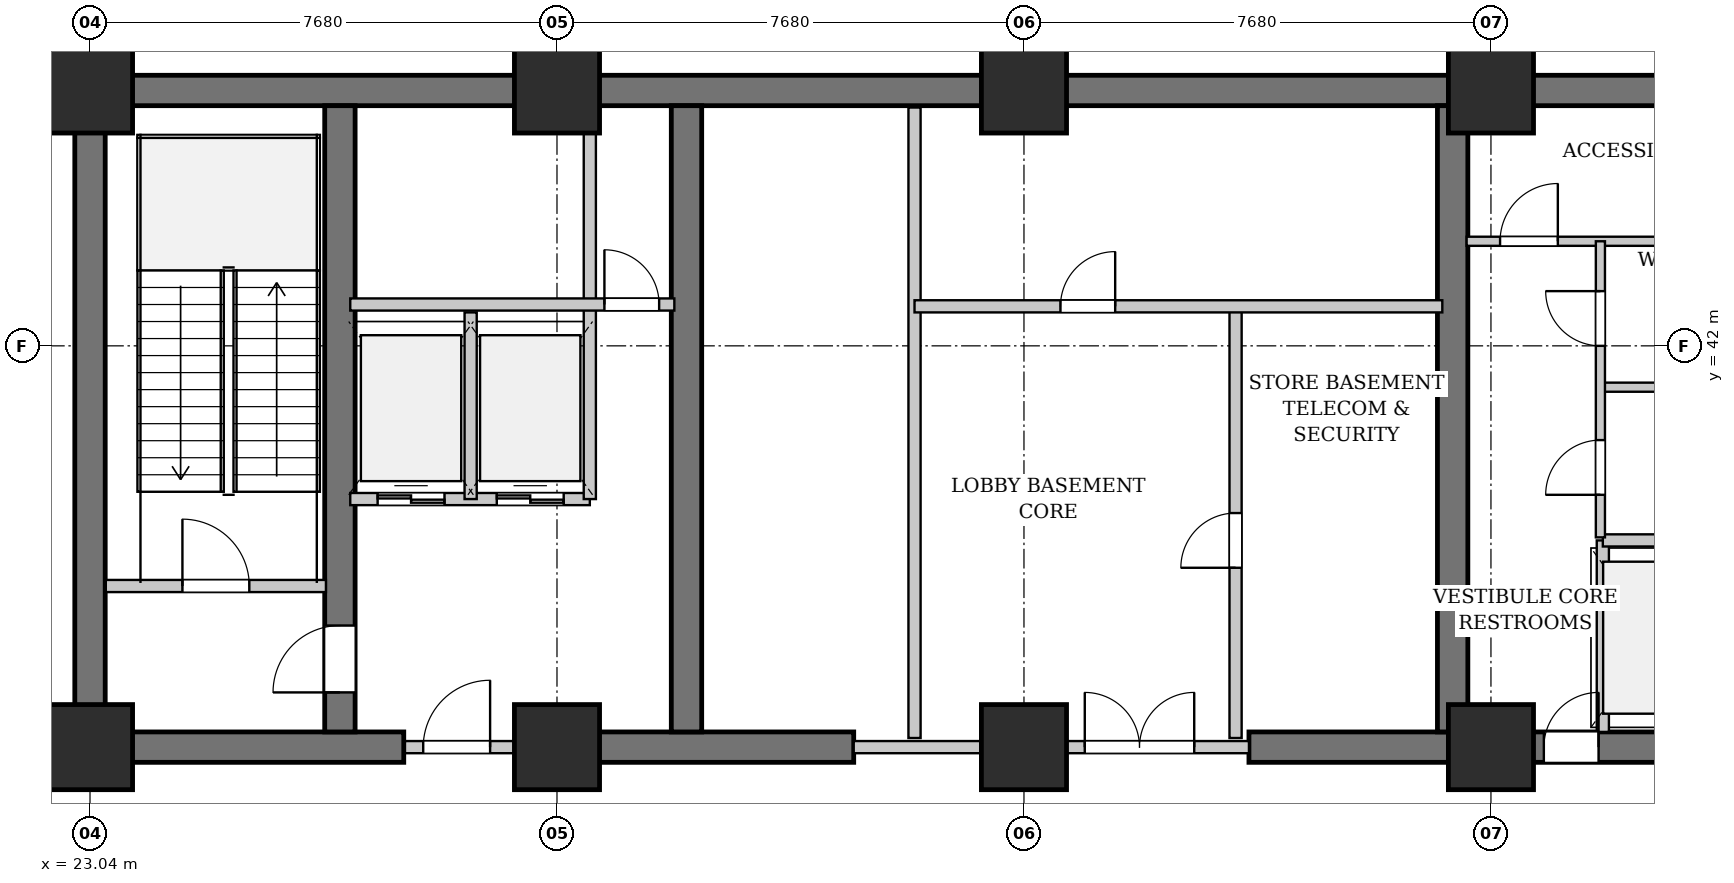
"""IFC4 building model, lengths in metres.
Left out: names, types, materials, properties, quantities, classifications, styles, units other than length and angle.
Written with IfcOpenShell. Run it as: python <this file> out.ifc"""

import sys

from ifc_helpers import new_model, si_unit, direction, frame, frame_2d, origin, origin_2d, place, context, subcontext, project, spatial, rectangle, extrude, element, fill, save


model = new_model("IFC4")
c1 = context("Model", 3, precision=1e-05, world=origin(), true_north=direction((0.0, 1.0)))
c2 = subcontext(c1, "Body", "Model", "MODEL_VIEW")
j1 = project(units=[si_unit("LENGTHUNIT", "METRE"), si_unit("PLANEANGLEUNIT", "RADIAN")], contexts=[c1])
p1 = place(None, origin())
s1 = spatial("IfcSite", under=j1, at=p1, CompositionType="ELEMENT")
p2 = place(p1, origin())
s2 = spatial("IfcBuilding", under=s1, at=p2, CompositionType="ELEMENT")
p3 = place(p2, frame((0.0, 0.0, -10.0)))
s3 = spatial("IfcBuildingStorey", under=s2, at=p3, CompositionType="ELEMENT", Elevation=-10.0)
p4 = place(p3, frame((22.79, 46.2, 0.0), z_axis=(0.0, 0.0, 1.0), x_axis=(1.0, 0.0, 0.0)))
e1 = element("IfcWall", 1, at=p4, inside=s3, PredefinedType="SHEAR", context=c2, shape_type="SweptSolid", body=[
    extrude(rectangle(XDim=31.22, YDim=0.5, at=frame_2d((15.61, 0.0))), origin(), (0.0, 0.0, 1.0), 4.65),
])
p5 = place(p3, frame((22.79, 35.4, 0.0), z_axis=(0.0, 0.0, 1.0), x_axis=(1.0, 0.0, 0.0)))
e2 = element("IfcWall", 2, at=p5, inside=s3, PredefinedType="SHEAR", context=c2, shape_type="SweptSolid", body=[
    extrude(rectangle(XDim=5.41, YDim=0.5, at=frame_2d((2.705, 0.0))), origin(), (0.0, 0.0, 1.0), 4.65),
])
p6 = place(p3, frame((30.72, 35.4, 0.0), z_axis=(0.0, 0.0, 1.0), x_axis=(1.0, 0.0, 0.0)))
e3 = element("IfcWall", 3, at=p6, inside=s3, PredefinedType="SHEAR", context=c2, shape_type="SweptSolid", body=[
    extrude(rectangle(XDim=4.88, YDim=0.5, at=frame_2d((2.44, 0.0))), origin(), (0.0, 0.0, 1.0), 4.65),
])
p7 = place(p3, frame((42.1, 35.4, 0.0), z_axis=(0.0, 0.0, 1.0), x_axis=(1.0, 0.0, 0.0)))
e4 = element("IfcWall", 4, at=p7, inside=s3, PredefinedType="SHEAR", context=c2, shape_type="SweptSolid", body=[
    extrude(rectangle(XDim=8.05, YDim=0.5, at=frame_2d((4.025, 0.0))), origin(), (0.0, 0.0, 1.0), 4.65),
])
p8 = place(p7, frame((4.85, 0.0, 0.0)))
e5 = element("IfcOpeningElement", 5, at=p8, cuts=e4, PredefinedType="OPENING", context=c2, shape_type="SweptSolid", body=[
    extrude(rectangle(XDim=0.9, YDim=2.15, at=frame_2d((0.45, 1.075))), frame((0.0, 0.26, 0.0), z_axis=(0.0, -1.0, 0.0), x_axis=(1.0, 0.0, 0.0)), (0.0, 0.0, 1.0), 0.52),
])
p9 = place(p3, frame((23.04, 35.65, 0.0), z_axis=(0.0, 0.0, 1.0), x_axis=(0.0, 1.0, 0.0)))
e6 = element("IfcWall", 6, at=p9, inside=s3, PredefinedType="SHEAR", context=c2, shape_type="SweptSolid", body=[
    extrude(rectangle(XDim=10.3, YDim=0.5, at=frame_2d((5.15, 0.0))), origin(), (0.0, 0.0, 1.0), 4.65),
])
p10 = place(p3, frame((27.15, 35.65, 0.0), z_axis=(0.0, 0.0, 1.0), x_axis=(0.0, 1.0, 0.0)))
e7 = element("IfcWall", 7, at=p10, inside=s3, PredefinedType="SHEAR", context=c2, shape_type="SweptSolid", body=[
    extrude(rectangle(XDim=10.3, YDim=0.5, at=frame_2d((5.15, 0.0))), origin(), (0.0, 0.0, 1.0), 4.65),
])
p11 = place(p10, frame((0.65, 0.0, 0.0)))
e8 = element("IfcOpeningElement", 8, at=p11, cuts=e7, PredefinedType="OPENING", context=c2, shape_type="SweptSolid", body=[
    extrude(rectangle(XDim=1.1, YDim=2.15, at=frame_2d((0.55, 1.075))), frame((0.0, 0.26, 0.0), z_axis=(0.0, -1.0, 0.0), x_axis=(1.0, 0.0, 0.0)), (0.0, 0.0, 1.0), 0.52),
])
for number, where, z_axis, x_axis in (
    (9, (32.85, 35.65, 0.0), (0.0, 0.0, 1.0), (0.0, 1.0, 0.0)),
    (10, (45.45, 35.65, 0.0), (0.0, 0.0, 1.0), (0.0, 1.0, 0.0)),
):
    element("IfcWall", number, at=place(p3, frame(where, z_axis=z_axis, x_axis=x_axis)), inside=s3, PredefinedType="SHEAR", context=c2, shape_type="SweptSolid", body=[
        extrude(rectangle(XDim=10.3, YDim=0.5, at=frame_2d((5.15, 0.0))), origin(), (0.0, 0.0, 1.0), 4.65),
    ])
for number, where, z_axis, x_axis in (
    (11, (23.04, 35.4, 0.0), (0.0, 0.0, 1.0), (1.0, 0.0, 0.0)),
    (12, (23.04, 46.2, 0.0), (0.0, 0.0, 1.0), (1.0, 0.0, 0.0)),
    (13, (30.72, 35.4, 0.0), (0.0, 0.0, 1.0), (1.0, 0.0, 0.0)),
    (14, (30.72, 46.2, 0.0), (0.0, 0.0, 1.0), (1.0, 0.0, 0.0)),
    (15, (38.4, 35.4, 0.0), (0.0, 0.0, 1.0), (1.0, 0.0, 0.0)),
    (16, (38.4, 46.2, 0.0), (0.0, 0.0, 1.0), (1.0, 0.0, 0.0)),
    (17, (46.08, 35.4, 0.0), (0.0, 0.0, 1.0), (1.0, 0.0, 0.0)),
    (18, (46.08, 46.2, 0.0), (0.0, 0.0, 1.0), (1.0, 0.0, 0.0)),
):
    element("IfcColumn", number, at=place(p3, frame(where, z_axis=z_axis, x_axis=x_axis)), inside=s3, PredefinedType="COLUMN", context=c2, shape_type="SweptSolid", body=[
        extrude(rectangle(XDim=1.4, YDim=1.4, at=origin_2d()), origin(), (0.0, 0.0, 1.0), 5.0),
    ])
p12 = place(p3, frame((23.3, 38.05, 0.0), z_axis=(0.0, 0.0, 1.0), x_axis=(1.0, 0.0, 0.0)))
e19 = element("IfcWall", 19, at=p12, inside=s3, PredefinedType="PARTITIONING", context=c2, shape_type="SweptSolid", body=[
    extrude(rectangle(XDim=3.62, YDim=0.2, at=frame_2d((1.81, 0.0))), origin(), (0.0, 0.0, 1.0), 4.65),
])
p13 = place(p12, frame((1.26, 0.0, 0.0)))
e20 = element("IfcOpeningElement", 20, at=p13, cuts=e19, PredefinedType="OPENING", context=c2, shape_type="SweptSolid", body=[
    extrude(rectangle(XDim=1.1, YDim=2.15, at=frame_2d((0.55, 1.075))), frame((0.0, 0.11, 0.0), z_axis=(0.0, -1.0, 0.0), x_axis=(1.0, 0.0, 0.0)), (0.0, 0.0, 1.0), 0.22),
])
p14 = place(p3, frame((28.22, 35.4, 0.0), z_axis=(0.0, 0.0, 1.0), x_axis=(1.0, 0.0, 0.0)))
e21 = element("IfcWall", 21, at=p14, inside=s3, PredefinedType="PARTITIONING", context=c2, shape_type="SweptSolid", body=[
    extrude(rectangle(XDim=2.5, YDim=0.2, at=frame_2d((1.25, 0.0))), origin(), (0.0, 0.0, 1.0), 3.845),
])
p15 = place(p14, frame((0.3, 0.0, 0.0)))
e22 = element("IfcOpeningElement", 22, at=p15, cuts=e21, PredefinedType="OPENING", context=c2, shape_type="SweptSolid", body=[
    extrude(rectangle(XDim=1.1, YDim=2.15, at=frame_2d((0.55, 1.075))), frame((0.0, 0.11, 0.0), z_axis=(0.0, -1.0, 0.0), x_axis=(1.0, 0.0, 0.0)), (0.0, 0.0, 1.0), 0.22),
])
p16 = place(p3, frame((27.32, 39.48, 0.0), z_axis=(0.0, 0.0, 1.0), x_axis=(1.0, 0.0, 0.0)))
e23 = element("IfcWall", 23, at=p16, inside=s3, PredefinedType="PARTITIONING", context=c2, shape_type="SweptSolid", body=[
    extrude(rectangle(XDim=3.94, YDim=0.2, at=frame_2d((1.97, 0.0))), origin(), (0.0, 0.0, 1.0), 4.65),
])
p17 = place(p16, frame((0.45, 0.0, 0.0)))
e24 = element("IfcOpeningElement", 24, at=p17, cuts=e23, PredefinedType="OPENING", context=c2, shape_type="SweptSolid", body=[
    extrude(rectangle(XDim=1.1, YDim=2.2, at=frame_2d((0.55, 1.1))), frame((0.0, 0.11, 0.0), z_axis=(0.0, -1.0, 0.0), x_axis=(1.0, 0.0, 0.0)), (0.0, 0.0, 1.0), 0.22),
])
p18 = place(p16, frame((2.41, 0.0, 0.0)))
e25 = element("IfcOpeningElement", 25, at=p18, cuts=e23, PredefinedType="OPENING", context=c2, shape_type="SweptSolid", body=[
    extrude(rectangle(XDim=1.1, YDim=2.2, at=frame_2d((0.55, 1.1))), frame((0.0, 0.11, 0.0), z_axis=(0.0, -1.0, 0.0), x_axis=(1.0, 0.0, 0.0)), (0.0, 0.0, 1.0), 0.22),
])
p19 = place(p3, frame((29.3, 39.48, 0.0), z_axis=(0.0, 0.0, 1.0), x_axis=(0.0, 1.0, 0.0)))
e26 = element("IfcWall", 26, at=p19, inside=s3, PredefinedType="PARTITIONING", context=c2, shape_type="SweptSolid", body=[
    extrude(rectangle(XDim=3.07, YDim=0.2, at=frame_2d((1.535, 0.0))), origin(), (0.0, 0.0, 1.0), 4.65),
])
p20 = place(p3, frame((31.26, 39.48, 0.0), z_axis=(0.0, 0.0, 1.0), x_axis=(0.0, 1.0, 0.0)))
e27 = element("IfcWall", 27, at=p20, inside=s3, PredefinedType="PARTITIONING", context=c2, shape_type="SweptSolid", body=[
    extrude(rectangle(XDim=6.44, YDim=0.2, at=frame_2d((3.22, 0.0))), origin(), (0.0, 0.0, 1.0), 4.65),
])
p21 = place(p3, frame((27.32, 42.68, 0.0), z_axis=(0.0, 0.0, 1.0), x_axis=(1.0, 0.0, 0.0)))
e28 = element("IfcWall", 28, at=p21, inside=s3, PredefinedType="PARTITIONING", context=c2, shape_type="SweptSolid", body=[
    extrude(rectangle(XDim=5.33, YDim=0.2, at=frame_2d((2.665, 0.0))), origin(), (0.0, 0.0, 1.0), 4.65),
])
p22 = place(p21, frame((4.18, 0.0, 0.0)))
e29 = element("IfcOpeningElement", 29, at=p22, cuts=e28, PredefinedType="OPENING", context=c2, shape_type="SweptSolid", body=[
    extrude(rectangle(XDim=0.9, YDim=2.15, at=frame_2d((0.45, 1.075))), frame((0.0, 0.11, 0.0), z_axis=(0.0, -1.0, 0.0), x_axis=(1.0, 0.0, 0.0)), (0.0, 0.0, 1.0), 0.22),
])
p23 = place(p3, frame((35.6, 35.4, 0.0), z_axis=(0.0, 0.0, 1.0), x_axis=(1.0, 0.0, 0.0)))
e30 = element("IfcWall", 30, at=p23, inside=s3, PredefinedType="PARTITIONING", context=c2, shape_type="SweptSolid", body=[
    extrude(rectangle(XDim=6.5, YDim=0.2, at=frame_2d((3.25, 0.0))), origin(), (0.0, 0.0, 1.0), 3.845),
])
p24 = place(p23, frame((3.8, 0.0, 0.0)))
e31 = element("IfcOpeningElement", 31, at=p24, cuts=e30, PredefinedType="OPENING", context=c2, shape_type="SweptSolid", body=[
    extrude(rectangle(XDim=1.8, YDim=2.3, at=frame_2d((0.9, 1.15))), frame((0.0, 0.11, 0.0), z_axis=(0.0, -1.0, 0.0), x_axis=(1.0, 0.0, 0.0)), (0.0, 0.0, 1.0), 0.22),
])
p25 = place(p3, frame((36.6, 35.55, 0.0), z_axis=(0.0, 0.0, 1.0), x_axis=(0.0, 1.0, 0.0)))
e32 = element("IfcWall", 32, at=p25, inside=s3, PredefinedType="PARTITIONING", context=c2, shape_type="SweptSolid", body=[
    extrude(rectangle(XDim=10.37, YDim=0.2, at=frame_2d((5.185, 0.0))), origin(), (0.0, 0.0, 1.0), 4.65),
])
p26 = place(p3, frame((41.88, 35.55, 0.0), z_axis=(0.0, 0.0, 1.0), x_axis=(0.0, 1.0, 0.0)))
e33 = element("IfcWall", 33, at=p26, inside=s3, PredefinedType="PARTITIONING", context=c2, shape_type="SweptSolid", body=[
    extrude(rectangle(XDim=7.1, YDim=0.2, at=frame_2d((3.55, 0.0))), origin(), (0.0, 0.0, 1.0), 4.65),
])
p27 = place(p26, frame((2.8, 0.0, 0.0)))
e34 = element("IfcOpeningElement", 34, at=p27, cuts=e33, PredefinedType="OPENING", context=c2, shape_type="SweptSolid", body=[
    extrude(rectangle(XDim=0.9, YDim=2.15, at=frame_2d((0.45, 1.075))), frame((0.0, 0.11, 0.0), z_axis=(0.0, -1.0, 0.0), x_axis=(1.0, 0.0, 0.0)), (0.0, 0.0, 1.0), 0.22),
])
p28 = place(p3, frame((36.6, 42.65, 0.0), z_axis=(0.0, 0.0, 1.0), x_axis=(1.0, 0.0, 0.0)))
e35 = element("IfcWall", 35, at=p28, inside=s3, PredefinedType="PARTITIONING", context=c2, shape_type="SweptSolid", body=[
    extrude(rectangle(XDim=8.68, YDim=0.2, at=frame_2d((4.34, 0.0))), origin(), (0.0, 0.0, 1.0), 4.65),
])
p29 = place(p28, frame((2.4, 0.0, 0.0)))
e36 = element("IfcOpeningElement", 36, at=p29, cuts=e35, PredefinedType="OPENING", context=c2, shape_type="SweptSolid", body=[
    extrude(rectangle(XDim=0.9, YDim=2.15, at=frame_2d((0.45, 1.075))), frame((0.0, 0.11, 0.0), z_axis=(0.0, -1.0, 0.0), x_axis=(1.0, 0.0, 0.0)), (0.0, 0.0, 1.0), 0.22),
])
p30 = place(p3, frame((47.92, 35.65, 0.0), z_axis=(0.0, 0.0, 1.0), x_axis=(0.0, 1.0, 0.0)))
e37 = element("IfcWall", 37, at=p30, inside=s3, PredefinedType="PARTITIONING", context=c2, shape_type="SweptSolid", body=[
    extrude(rectangle(XDim=3.15, YDim=0.2, at=frame_2d((1.575, 0.0))), origin(), (0.0, 0.0, 1.0), 4.65),
])
p31 = place(p3, frame((47.92, 38.8, 0.0), z_axis=(0.0, 0.0, 1.0), x_axis=(1.0, 0.0, 0.0)))
e38 = element("IfcWall", 38, at=p31, inside=s3, PredefinedType="PARTITIONING", context=c2, shape_type="SweptSolid", body=[
    extrude(rectangle(XDim=1.86, YDim=0.2, at=frame_2d((0.93, 0.0))), origin(), (0.0, 0.0, 1.0), 4.65),
])
p32 = place(p3, frame((45.68, 43.72, 0.0), z_axis=(0.0, 0.0, 1.0), x_axis=(1.0, 0.0, 0.0)))
e39 = element("IfcWall", 39, at=p32, inside=s3, PredefinedType="PARTITIONING", context=c2, shape_type="SweptSolid", body=[
    extrude(rectangle(XDim=4.5, YDim=0.15, at=frame_2d((2.25, 0.0))), origin(), (0.0, 0.0, 1.0), 4.65),
])
p33 = place(p32, frame((0.55, 0.0, 0.0)))
e40 = element("IfcOpeningElement", 40, at=p33, cuts=e39, PredefinedType="OPENING", context=c2, shape_type="SweptSolid", body=[
    extrude(rectangle(XDim=0.95, YDim=2.15, at=frame_2d((0.475, 1.075))), frame((0.0, 0.085, 0.0), z_axis=(0.0, -1.0, 0.0), x_axis=(1.0, 0.0, 0.0)), (0.0, 0.0, 1.0), 0.17),
])
p34 = place(p3, frame((47.88, 41.32, 0.0), z_axis=(0.0, 0.0, 1.0), x_axis=(1.0, 0.0, 0.0)))
e41 = element("IfcWall", 41, at=p34, inside=s3, PredefinedType="PARTITIONING", context=c2, shape_type="SweptSolid", body=[
    extrude(rectangle(XDim=2.3, YDim=0.15, at=frame_2d((1.15, 0.0))), origin(), (0.0, 0.0, 1.0), 4.65),
])
p35 = place(p3, frame((47.88, 38.85, 0.0), z_axis=(0.0, 0.0, 1.0), x_axis=(0.0, 1.0, 0.0)))
e42 = element("IfcWall", 42, at=p35, inside=s3, PredefinedType="PARTITIONING", context=c2, shape_type="SweptSolid", body=[
    extrude(rectangle(XDim=4.87, YDim=0.15, at=frame_2d((2.435, 0.0))), origin(), (0.0, 0.0, 1.0), 4.65),
])
p36 = place(p35, frame((0.7, 0.0, 0.0)))
e43 = element("IfcOpeningElement", 43, at=p36, cuts=e42, PredefinedType="OPENING", context=c2, shape_type="SweptSolid", body=[
    extrude(rectangle(XDim=0.9, YDim=2.15, at=frame_2d((0.45, 1.075))), frame((0.0, 0.085, 0.0), z_axis=(0.0, -1.0, 0.0), x_axis=(1.0, 0.0, 0.0)), (0.0, 0.0, 1.0), 0.17),
])
p37 = place(p35, frame((3.15, 0.0, 0.0)))
e44 = element("IfcOpeningElement", 44, at=p37, cuts=e42, PredefinedType="OPENING", context=c2, shape_type="SweptSolid", body=[
    extrude(rectangle(XDim=0.9, YDim=2.15, at=frame_2d((0.45, 1.075))), frame((0.0, 0.085, 0.0), z_axis=(0.0, -1.0, 0.0), x_axis=(1.0, 0.0, 0.0)), (0.0, 0.0, 1.0), 0.17),
])
p38 = place(p3, frame((16.8, 35.28, 0.0), z_axis=(0.0, 0.0, 1.0), x_axis=(1.0, 0.0, 0.0)))
e45 = element("IfcWall", 45, at=p38, inside=s3, PredefinedType="PARTITIONING", context=c2, shape_type="SweptSolid", body=[
    extrude(rectangle(XDim=5.95, YDim=0.2, at=frame_2d((2.975, 0.0))), origin(), (0.0, 0.0, 1.0), 3.845),
])
p39 = place(p38, frame((2.425, 0.0, 0.0)))
e46 = element("IfcOpeningElement", 46, at=p39, cuts=e45, PredefinedType="OPENING", context=c2, shape_type="SweptSolid", body=[
    extrude(rectangle(XDim=1.1, YDim=2.15, at=frame_2d((0.55, 1.075))), frame((0.0, 0.11, 0.0), z_axis=(0.0, -1.0, 0.0), x_axis=(1.0, 0.0, 0.0)), (0.0, 0.0, 1.0), 0.22),
])
p40 = place(p13, origin())
e47 = element("IfcDoor", 47, at=p40, inside=s3, OperationType="SINGLE_SWING_LEFT", PredefinedType="DOOR", context=c2, shape_type="SweptSolid", body=[
    extrude(rectangle(XDim=1.1, YDim=2.15, at=frame_2d((0.55, 1.075))), frame((0.0, 0.025, 0.0), z_axis=(0.0, -1.0, 0.0), x_axis=(1.0, 0.0, 0.0)), (0.0, 0.0, 1.0), 0.05),
])
fill(e20, e47)
p41 = place(p15, origin())
e48 = element("IfcDoor", 48, at=p41, inside=s3, OperationType="SINGLE_SWING_RIGHT", PredefinedType="DOOR", context=c2, shape_type="SweptSolid", body=[
    extrude(rectangle(XDim=1.1, YDim=2.15, at=frame_2d((0.55, 1.075))), frame((0.0, 0.025, 0.0), z_axis=(0.0, -1.0, 0.0), x_axis=(1.0, 0.0, 0.0)), (0.0, 0.0, 1.0), 0.05),
])
fill(e22, e48)
p42 = place(p17, origin())
e49 = element("IfcDoor", 49, at=p42, inside=s3, OperationType="DOUBLE_DOOR_SLIDING", PredefinedType="DOOR", context=c2, shape_type="SweptSolid", body=[
    extrude(rectangle(XDim=1.1, YDim=2.2, at=frame_2d((0.55, 1.1))), frame((0.0, 0.025, 0.0), z_axis=(0.0, -1.0, 0.0), x_axis=(1.0, 0.0, 0.0)), (0.0, 0.0, 1.0), 0.05),
])
fill(e24, e49)
p43 = place(p18, origin())
e50 = element("IfcDoor", 50, at=p43, inside=s3, OperationType="DOUBLE_DOOR_SLIDING", PredefinedType="DOOR", context=c2, shape_type="SweptSolid", body=[
    extrude(rectangle(XDim=1.1, YDim=2.2, at=frame_2d((0.55, 1.1))), frame((0.0, 0.025, 0.0), z_axis=(0.0, -1.0, 0.0), x_axis=(1.0, 0.0, 0.0)), (0.0, 0.0, 1.0), 0.05),
])
fill(e25, e50)
p44 = place(p22, origin())
e51 = element("IfcDoor", 51, at=p44, inside=s3, OperationType="SINGLE_SWING_LEFT", PredefinedType="DOOR", context=c2, shape_type="SweptSolid", body=[
    extrude(rectangle(XDim=0.9, YDim=2.15, at=frame_2d((0.45, 1.075))), frame((0.0, 0.025, 0.0), z_axis=(0.0, -1.0, 0.0), x_axis=(1.0, 0.0, 0.0)), (0.0, 0.0, 1.0), 0.05),
])
fill(e29, e51)
p45 = place(p24, origin())
e52 = element("IfcDoor", 52, at=p45, inside=s3, OperationType="DOUBLE_DOOR_SINGLE_SWING", PredefinedType="DOOR", context=c2, shape_type="SweptSolid", body=[
    extrude(rectangle(XDim=1.8, YDim=2.3, at=frame_2d((0.9, 1.15))), frame((0.0, 0.025, 0.0), z_axis=(0.0, -1.0, 0.0), x_axis=(1.0, 0.0, 0.0)), (0.0, 0.0, 1.0), 0.05),
])
fill(e31, e52)
p46 = place(p27, origin())
e53 = element("IfcDoor", 53, at=p46, inside=s3, OperationType="SINGLE_SWING_LEFT", PredefinedType="DOOR", context=c2, shape_type="SweptSolid", body=[
    extrude(rectangle(XDim=0.9, YDim=2.15, at=frame_2d((0.45, 1.075))), frame((0.0, 0.025, 0.0), z_axis=(0.0, -1.0, 0.0), x_axis=(1.0, 0.0, 0.0)), (0.0, 0.0, 1.0), 0.05),
])
fill(e34, e53)
p47 = place(p29, origin())
e54 = element("IfcDoor", 54, at=p47, inside=s3, OperationType="SINGLE_SWING_RIGHT", PredefinedType="DOOR", context=c2, shape_type="SweptSolid", body=[
    extrude(rectangle(XDim=0.9, YDim=2.15, at=frame_2d((0.45, 1.075))), frame((0.0, 0.025, 0.0), z_axis=(0.0, -1.0, 0.0), x_axis=(1.0, 0.0, 0.0)), (0.0, 0.0, 1.0), 0.05),
])
fill(e36, e54)
p48 = place(p33, origin())
e55 = element("IfcDoor", 55, at=p48, inside=s3, OperationType="SINGLE_SWING_RIGHT", PredefinedType="DOOR", context=c2, shape_type="SweptSolid", body=[
    extrude(rectangle(XDim=0.95, YDim=2.15, at=frame_2d((0.475, 1.075))), frame((0.0, 0.025, 0.0), z_axis=(0.0, -1.0, 0.0), x_axis=(1.0, 0.0, 0.0)), (0.0, 0.0, 1.0), 0.05),
])
fill(e40, e55)
p49 = place(p36, origin())
e56 = element("IfcDoor", 56, at=p49, inside=s3, OperationType="SINGLE_SWING_LEFT", PredefinedType="DOOR", context=c2, shape_type="SweptSolid", body=[
    extrude(rectangle(XDim=0.9, YDim=2.15, at=frame_2d((0.45, 1.075))), frame((0.0, 0.025, 0.0), z_axis=(0.0, -1.0, 0.0), x_axis=(1.0, 0.0, 0.0)), (0.0, 0.0, 1.0), 0.05),
])
fill(e43, e56)
p50 = place(p37, origin())
e57 = element("IfcDoor", 57, at=p50, inside=s3, OperationType="SINGLE_SWING_RIGHT", PredefinedType="DOOR", context=c2, shape_type="SweptSolid", body=[
    extrude(rectangle(XDim=0.9, YDim=2.15, at=frame_2d((0.45, 1.075))), frame((0.0, 0.025, 0.0), z_axis=(0.0, -1.0, 0.0), x_axis=(1.0, 0.0, 0.0)), (0.0, 0.0, 1.0), 0.05),
])
fill(e44, e57)
p51 = place(p11, origin())
e58 = element("IfcDoor", 58, at=p51, inside=s3, OperationType="SINGLE_SWING_LEFT", PredefinedType="DOOR", context=c2, shape_type="SweptSolid", body=[
    extrude(rectangle(XDim=1.1, YDim=2.15, at=frame_2d((0.55, 1.075))), frame((0.0, 0.025, 0.0), z_axis=(0.0, -1.0, 0.0), x_axis=(1.0, 0.0, 0.0)), (0.0, 0.0, 1.0), 0.05),
])
fill(e8, e58)
p52 = place(p8, origin())
e59 = element("IfcDoor", 59, at=p52, inside=s3, OperationType="SINGLE_SWING_RIGHT", PredefinedType="DOOR", context=c2, shape_type="SweptSolid", body=[
    extrude(rectangle(XDim=0.9, YDim=2.15, at=frame_2d((0.45, 1.075))), frame((0.0, 0.025, 0.0), z_axis=(0.0, -1.0, 0.0), x_axis=(1.0, 0.0, 0.0)), (0.0, 0.0, 1.0), 0.05),
])
fill(e5, e59)
save(model, sys.argv[1])
